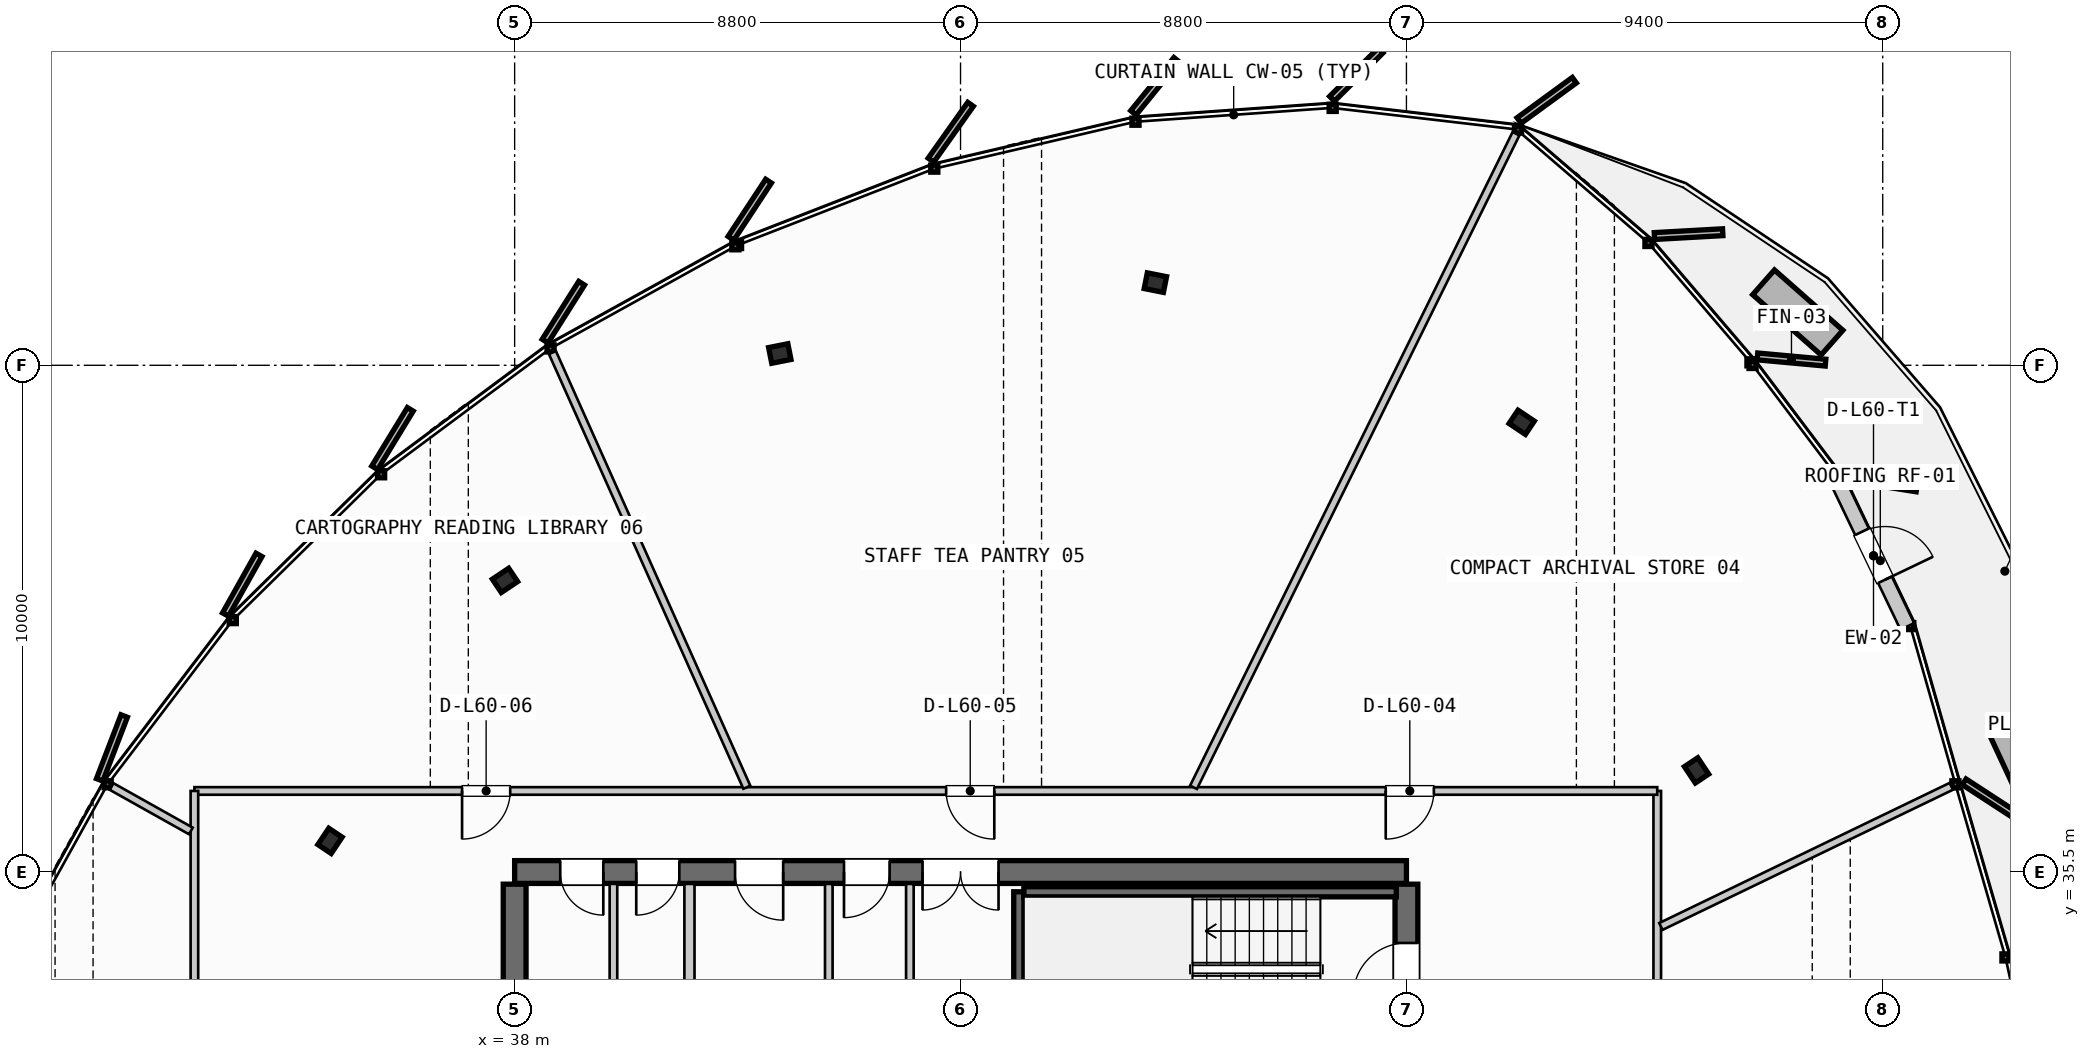
"""IFC4 building model, lengths in metres.
Left out: names, types, materials, properties, quantities, classifications, styles, units other than length and angle.
Written with IfcOpenShell. Run it as: python <this file> out.ifc"""

import sys

from ifc_helpers import new_model, si_unit, direction, frame, frame_2d, origin, origin_2d, place, context, subcontext, project, spatial, rectangle, i_section, extrude, source, transform, mapped, element, fill, save


model = new_model("IFC4")
c1 = context("Model", 3, precision=1e-05, world=origin(), true_north=direction((0.0, 1.0)))
c2 = subcontext(c1, "Body", "Model", "MODEL_VIEW")
j1 = project(units=[si_unit("LENGTHUNIT", "METRE"), si_unit("PLANEANGLEUNIT", "RADIAN")], contexts=[c1])
p1 = place(None, origin())
s1 = spatial("IfcSite", under=j1, at=p1, CompositionType="ELEMENT")
p2 = place(p1, origin())
s2 = spatial("IfcBuilding", under=s1, at=p2, CompositionType="ELEMENT")
p3 = place(p2, frame((0.0, 0.0, 231.85)))
s3 = spatial("IfcBuildingStorey", under=s2, at=p3, CompositionType="ELEMENT", Elevation=231.85)
p4 = place(p3, frame((55.6, 35.5, 0.0), z_axis=(0.0, 0.0, 1.0), x_axis=(-1.0, 0.0, 0.0)))
e1 = element("IfcWall", 1, at=p4, inside=s3, PredefinedType="SHEAR", context=c2, shape_type="SweptSolid", body=[
    extrude(rectangle(XDim=17.6, YDim=0.45, at=frame_2d((8.8, 0.0))), origin(), (0.0, 0.0, 1.0), 3.21),
])
p5 = place(p4, frame((8.05, 0.0, 0.0)))
e2 = element("IfcOpeningElement", 2, at=p5, cuts=e1, PredefinedType="OPENING", context=c2, shape_type="SweptSolid", body=[
    extrude(rectangle(XDim=1.5, YDim=2.2, at=frame_2d((0.75, 1.1))), frame((0.0, 0.235, 0.0), z_axis=(0.0, -1.0, 0.0), x_axis=(1.0, 0.0, 0.0)), (0.0, 0.0, 1.0), 0.47),
])
p6 = place(p4, frame((15.85, 0.0, 0.0)))
e3 = element("IfcOpeningElement", 3, at=p6, cuts=e1, PredefinedType="OPENING", context=c2, shape_type="SweptSolid", body=[
    extrude(rectangle(XDim=0.85, YDim=2.15, at=frame_2d((0.425, 1.075))), frame((0.0, 0.235, 0.0), z_axis=(0.0, -1.0, 0.0), x_axis=(1.0, 0.0, 0.0)), (0.0, 0.0, 1.0), 0.47),
])
p7 = place(p4, frame((14.35, 0.0, 0.0)))
e4 = element("IfcOpeningElement", 4, at=p7, cuts=e1, PredefinedType="OPENING", context=c2, shape_type="SweptSolid", body=[
    extrude(rectangle(XDim=0.85, YDim=2.15, at=frame_2d((0.425, 1.075))), frame((0.0, 0.235, 0.0), z_axis=(0.0, -1.0, 0.0), x_axis=(1.0, 0.0, 0.0)), (0.0, 0.0, 1.0), 0.47),
])
p8 = place(p4, frame((12.3, 0.0, 0.0)))
e5 = element("IfcOpeningElement", 5, at=p8, cuts=e1, PredefinedType="OPENING", context=c2, shape_type="SweptSolid", body=[
    extrude(rectangle(XDim=0.95, YDim=2.15, at=frame_2d((0.475, 1.075))), frame((0.0, 0.235, 0.0), z_axis=(0.0, -1.0, 0.0), x_axis=(1.0, 0.0, 0.0)), (0.0, 0.0, 1.0), 0.47),
])
p9 = place(p4, frame((10.2, 0.0, 0.0)))
e6 = element("IfcOpeningElement", 6, at=p9, cuts=e1, PredefinedType="OPENING", context=c2, shape_type="SweptSolid", body=[
    extrude(rectangle(XDim=0.9, YDim=2.15, at=frame_2d((0.45, 1.075))), frame((0.0, 0.235, 0.0), z_axis=(0.0, -1.0, 0.0), x_axis=(1.0, 0.0, 0.0)), (0.0, 0.0, 1.0), 0.47),
])
p10 = place(p3, frame((38.0, 35.26, 0.0), z_axis=(0.0, 0.0, 1.0), x_axis=(0.0, -1.0, 0.0)))
e7 = element("IfcWall", 7, at=p10, inside=s3, PredefinedType="SHEAR", context=c2, shape_type="SweptSolid", body=[
    extrude(rectangle(XDim=14.92, YDim=0.45, at=frame_2d((7.46, 0.0))), origin(), (0.0, 0.0, 1.0), 3.21),
])
p11 = place(p10, frame((5.21, 0.0, 0.0)))
e8 = element("IfcOpeningElement", 8, at=p11, cuts=e7, PredefinedType="OPENING", context=c2, shape_type="SweptSolid", body=[
    extrude(rectangle(XDim=1.1, YDim=2.2, at=frame_2d((0.55, 1.1))), frame((0.0, 0.235, 0.0), z_axis=(0.0, -1.0, 0.0), x_axis=(1.0, 0.0, 0.0)), (0.0, 0.0, 1.0), 0.47),
])
p12 = place(p3, frame((55.6, 20.34, 0.0), z_axis=(0.0, 0.0, 1.0), x_axis=(0.0, 1.0, 0.0)))
e9 = element("IfcWall", 9, at=p12, inside=s3, PredefinedType="SHEAR", context=c2, shape_type="SweptSolid", body=[
    extrude(rectangle(XDim=14.92, YDim=0.45, at=frame_2d((7.46, 0.0))), origin(), (0.0, 0.0, 1.0), 3.21),
])
p13 = place(p12, frame((12.71, 0.0, 0.0)))
e10 = element("IfcOpeningElement", 10, at=p13, cuts=e9, PredefinedType="OPENING", context=c2, shape_type="SweptSolid", body=[
    extrude(rectangle(XDim=1.05, YDim=2.15, at=frame_2d((0.525, 1.075))), frame((0.0, 0.235, 0.0), z_axis=(0.0, -1.0, 0.0), x_axis=(1.0, 0.0, 0.0)), (0.0, 0.0, 1.0), 0.47),
])
p14 = place(p12, frame((8.61, 0.0, 0.0)))
e11 = element("IfcOpeningElement", 11, at=p14, cuts=e9, PredefinedType="OPENING", context=c2, shape_type="SweptSolid", body=[
    extrude(rectangle(XDim=1.1, YDim=2.2, at=frame_2d((0.55, 1.1))), frame((0.0, 0.235, 0.0), z_axis=(0.0, -1.0, 0.0), x_axis=(1.0, 0.0, 0.0)), (0.0, 0.0, 1.0), 0.47),
])
m1 = source(origin(), c2, "Body", "SweptSolid", [
    extrude(i_section(OverallWidth=0.387, OverallDepth=0.316, WebThickness=0.019, FlangeThickness=0.028, FilletRadius=0.015, at=origin_2d()), origin(), (0.0, 0.0, 1.0), 3.21),
])
for number, where, z_axis, x_axis in (
    (12, (61.326, 37.506, 0.0), (0.0, 0.0, 1.0), (0.831, 0.556, 0.0)),
    (13, (57.875, 44.375, 0.0), (0.0, 0.0, 1.0), (0.556, 0.831, 0.0)),
    (14, (50.645, 47.132, 0.0), (0.0, 0.0, 1.0), (0.195, 0.981, 0.0)),
    (15, (43.233, 45.732, 0.0), (0.0, 0.0, 1.0), (-0.195, 0.981, 0.0)),
    (16, (37.81, 41.255, 0.0), (0.0, 0.0, 1.0), (-0.556, 0.831, 0.0)),
    (17, (34.356, 36.115, 0.0), (0.0, 0.0, 1.0), (-0.831, 0.556, 0.0)),
):
    element("IfcColumn", number, at=place(p3, frame(where, z_axis=z_axis, x_axis=x_axis)), inside=s3, PredefinedType="COLUMN", context=c2, shape_type="MappedRepresentation", body=[
        mapped(m1, transform((0.0, 0.0, 0.0), scale=1.0)),
    ])
p15 = place(p3, frame((64.15, 43.136, 0.0), z_axis=(0.0, 0.0, 1.0), x_axis=(0.431829849954, -0.901955087955, 0.0)))
e18 = element("IfcWall", 18, at=p15, inside=s3, PredefinedType="SOLIDWALL", context=c2, shape_type="SweptSolid", body=[
    extrude(rectangle(XDim=3.092, YDim=0.3, at=frame_2d((1.546, 0.0))), origin(), (0.0, 0.0, 1.0), 2.735),
])
p16 = place(p15, frame((1.021, 0.0, 0.0)))
e19 = element("IfcOpeningElement", 19, at=p16, cuts=e18, PredefinedType="OPENING", context=c2, shape_type="SweptSolid", body=[
    extrude(rectangle(XDim=1.05, YDim=2.2, at=frame_2d((0.525, 1.1))), frame((0.0, 0.16, 0.0), z_axis=(0.0, -1.0, 0.0), x_axis=(1.0, 0.0, 0.0)), (0.0, 0.0, 1.0), 0.32),
])
p17 = place(p3, frame((47.95, 32.05, 0.0), z_axis=(0.0, 0.0, 1.0), x_axis=(0.0, 1.0, 0.0)))
e20 = element("IfcWall", 20, at=p17, inside=s3, PredefinedType="SHEAR", context=c2, shape_type="SweptSolid", body=[
    extrude(rectangle(XDim=3.06, YDim=0.2, at=frame_2d((1.53, 0.0))), origin(), (0.0, 0.0, 1.0), 3.21),
])
p18 = place(p3, frame((48.05, 35.11, 0.0), z_axis=(0.0, 0.0, 1.0), x_axis=(1.0, 0.0, 0.0)))
e21 = element("IfcWall", 21, at=p18, inside=s3, PredefinedType="SHEAR", context=c2, shape_type="SweptSolid", body=[
    extrude(rectangle(XDim=7.35, YDim=0.2, at=frame_2d((3.675, 0.0))), origin(), (0.0, 0.0, 1.0), 3.21),
])
p19 = place(p3, frame((41.45, 31.85, 0.0), z_axis=(0.0, 0.0, 1.0), x_axis=(0.0, 1.0, 0.0)))
e22 = element("IfcWall", 22, at=p19, inside=s3, PredefinedType="PARTITIONING", context=c2, shape_type="SweptSolid", body=[
    extrude(rectangle(XDim=3.415, YDim=0.2, at=frame_2d((1.708, 0.0))), origin(), (0.0, 0.0, 1.0), 2.28),
])
for number, where, z_axis, x_axis in (
    (23, (45.8, 31.85, 0.0), (0.0, 0.0, 1.0), (0.0, 1.0, 0.0)),
    (24, (39.95, 31.85, 0.0), (0.0, 0.0, 1.0), (0.0, 1.0, 0.0)),
):
    element("IfcWall", number, at=place(p3, frame(where, z_axis=z_axis, x_axis=x_axis)), inside=s3, PredefinedType="PARTITIONING", context=c2, shape_type="SweptSolid", body=[
        extrude(rectangle(XDim=3.415, YDim=0.15, at=frame_2d((1.708, 0.0))), origin(), (0.0, 0.0, 1.0), 2.28),
    ])
p20 = place(p3, frame((44.2, 31.85, 0.0), z_axis=(0.0, 0.0, 1.0), x_axis=(0.0, 1.0, 0.0)))
e25 = element("IfcWall", 25, at=p20, inside=s3, PredefinedType="PLUMBINGWALL", context=c2, shape_type="SweptSolid", body=[
    extrude(rectangle(XDim=3.415, YDim=0.15, at=frame_2d((1.708, 0.0))), origin(), (0.0, 0.0, 1.0), 2.28),
])
p21 = place(p3, frame((60.55, 18.269, 0.0), z_axis=(0.0, 0.0, 1.0), x_axis=(0.0, 1.0, 0.0)))
e26 = element("IfcWall", 26, at=p21, inside=s3, PredefinedType="PARTITIONING", context=c2, shape_type="SweptSolid", body=[
    extrude(rectangle(XDim=18.831, YDim=0.15, at=frame_2d((9.416, 0.0))), origin(), (0.0, 0.0, 1.0), 2.28),
])
p22 = place(p21, frame((8.508, 0.0, 0.0)))
e27 = element("IfcOpeningElement", 27, at=p22, cuts=e26, PredefinedType="OPENING", context=c2, shape_type="SweptSolid", body=[
    extrude(rectangle(XDim=0.95, YDim=2.15, at=frame_2d((0.475, 1.075))), frame((0.0, 0.085, 0.0), z_axis=(0.0, -1.0, 0.0), x_axis=(1.0, 0.0, 0.0)), (0.0, 0.0, 1.0), 0.17),
])
p23 = place(p3, frame((60.55, 37.1, 0.0), z_axis=(0.0, 0.0, 1.0), x_axis=(-1.0, 0.0, 0.0)))
e28 = element("IfcWall", 28, at=p23, inside=s3, PredefinedType="PARTITIONING", context=c2, shape_type="SweptSolid", body=[
    extrude(rectangle(XDim=28.87, YDim=0.15, at=frame_2d((14.435, 0.0))), origin(), (0.0, 0.0, 1.0), 2.28),
])
p24 = place(p23, frame((4.409, 0.0, 0.0)))
e29 = element("IfcOpeningElement", 29, at=p24, cuts=e28, PredefinedType="OPENING", context=c2, shape_type="SweptSolid", body=[
    extrude(rectangle(XDim=0.95, YDim=2.15, at=frame_2d((0.475, 1.075))), frame((0.0, 0.085, 0.0), z_axis=(0.0, -1.0, 0.0), x_axis=(1.0, 0.0, 0.0)), (0.0, 0.0, 1.0), 0.17),
])
p25 = place(p23, frame((13.084, 0.0, 0.0)))
e30 = element("IfcOpeningElement", 30, at=p25, cuts=e28, PredefinedType="OPENING", context=c2, shape_type="SweptSolid", body=[
    extrude(rectangle(XDim=0.95, YDim=2.15, at=frame_2d((0.475, 1.075))), frame((0.0, 0.085, 0.0), z_axis=(0.0, -1.0, 0.0), x_axis=(1.0, 0.0, 0.0)), (0.0, 0.0, 1.0), 0.17),
])
p26 = place(p23, frame((22.637, 0.0, 0.0)))
e31 = element("IfcOpeningElement", 31, at=p26, cuts=e28, PredefinedType="OPENING", context=c2, shape_type="SweptSolid", body=[
    extrude(rectangle(XDim=0.95, YDim=2.15, at=frame_2d((0.475, 1.075))), frame((0.0, 0.085, 0.0), z_axis=(0.0, -1.0, 0.0), x_axis=(1.0, 0.0, 0.0)), (0.0, 0.0, 1.0), 0.17),
])
p27 = place(p3, frame((31.68, 37.1, 0.0), z_axis=(0.0, 0.0, 1.0), x_axis=(0.0, -1.0, 0.0)))
e32 = element("IfcWall", 32, at=p27, inside=s3, PredefinedType="PARTITIONING", context=c2, shape_type="SweptSolid", body=[
    extrude(rectangle(XDim=18.831, YDim=0.15, at=frame_2d((9.416, 0.0))), origin(), (0.0, 0.0, 1.0), 2.28),
])
p28 = place(p27, frame((9.044, 0.0, 0.0)))
e33 = element("IfcOpeningElement", 33, at=p28, cuts=e32, PredefinedType="OPENING", context=c2, shape_type="SweptSolid", body=[
    extrude(rectangle(XDim=0.95, YDim=2.15, at=frame_2d((0.475, 1.075))), frame((0.0, 0.085, 0.0), z_axis=(0.0, -1.0, 0.0), x_axis=(1.0, 0.0, 0.0)), (0.0, 0.0, 1.0), 0.17),
])
p29 = place(p3, frame((60.622, 34.426, 0.0), z_axis=(0.0, 0.0, 1.0), x_axis=(0.900645362469, 0.434554865424, 0.0)))
e34 = element("IfcWall", 34, at=p29, inside=s3, PredefinedType="PARTITIONING", context=c2, shape_type="SweptSolid", body=[
    extrude(rectangle(XDim=6.364, YDim=0.15, at=frame_2d((3.182, 0.0))), origin(), (0.0, 0.0, 1.0), 2.28),
])
p30 = place(p3, frame((51.398, 37.172, 0.0), z_axis=(0.0, 0.0, 1.0), x_axis=(0.442495584372, 0.896770682957, 0.0)))
e35 = element("IfcWall", 35, at=p30, inside=s3, PredefinedType="PARTITIONING", context=c2, shape_type="SweptSolid", body=[
    extrude(rectangle(XDim=14.384, YDim=0.15, at=frame_2d((7.192, 0.0))), origin(), (0.0, 0.0, 1.0), 2.28),
])
p31 = place(p3, frame((42.583, 37.173, 0.0), z_axis=(0.0, 0.0, 1.0), x_axis=(-0.40829484659, 0.912850107218, 0.0)))
e36 = element("IfcWall", 36, at=p31, inside=s3, PredefinedType="PARTITIONING", context=c2, shape_type="SweptSolid", body=[
    extrude(rectangle(XDim=9.397, YDim=0.15, at=frame_2d((4.698, 0.0))), origin(), (0.0, 0.0, 1.0), 2.28),
])
p32 = place(p3, frame((31.61, 36.311, 0.0), z_axis=(0.0, 0.0, 1.0), x_axis=(-0.872236549991, 0.489084247201, 0.0)))
e37 = element("IfcWall", 37, at=p32, inside=s3, PredefinedType="PARTITIONING", context=c2, shape_type="SweptSolid", body=[
    extrude(rectangle(XDim=1.793, YDim=0.15, at=frame_2d((0.896, 0.0))), origin(), (0.0, 0.0, 1.0), 2.28),
])
m2 = source(origin(), c2, "Body", "SweptSolid", [
    extrude(rectangle(XDim=1.05, YDim=2.2, at=frame_2d((0.525, 1.1))), frame((0.0, 0.025, 0.0), z_axis=(0.0, -1.0, 0.0), x_axis=(1.0, 0.0, 0.0)), (0.0, 0.0, 1.0), 0.05),
])
p33 = place(p16, origin())
e38 = element("IfcDoor", 38, at=p33, inside=s3, OperationType="SINGLE_SWING_RIGHT", PredefinedType="DOOR", context=c2, shape_type="MappedRepresentation", body=[
    mapped(m2, transform((0.0, 0.0, 0.0), scale=1.0)),
])
fill(e19, e38)
m3 = source(origin(), c2, "Body", "SweptSolid", [
    extrude(rectangle(XDim=1.05, YDim=2.15, at=frame_2d((0.525, 1.075))), frame((0.0, 0.025, 0.0), z_axis=(0.0, -1.0, 0.0), x_axis=(1.0, 0.0, 0.0)), (0.0, 0.0, 1.0), 0.05),
])
p34 = place(p13, origin())
e39 = element("IfcDoor", 39, at=p34, inside=s3, OperationType="SINGLE_SWING_LEFT", PredefinedType="DOOR", context=c2, shape_type="MappedRepresentation", body=[
    mapped(m3, transform((0.0, 0.0, 0.0), scale=1.0)),
])
fill(e10, e39)
m4 = source(origin(), c2, "Body", "SweptSolid", [
    extrude(rectangle(XDim=1.5, YDim=2.2, at=frame_2d((0.75, 1.1))), frame((0.0, 0.025, 0.0), z_axis=(0.0, -1.0, 0.0), x_axis=(1.0, 0.0, 0.0)), (0.0, 0.0, 1.0), 0.05),
])
p35 = place(p5, origin())
e40 = element("IfcDoor", 40, at=p35, inside=s3, OperationType="DOUBLE_DOOR_SINGLE_SWING", PredefinedType="DOOR", context=c2, shape_type="MappedRepresentation", body=[
    mapped(m4, transform((0.0, 0.0, 0.0), scale=1.0)),
])
fill(e2, e40)
m5 = source(origin(), c2, "Body", "SweptSolid", [
    extrude(rectangle(XDim=0.85, YDim=2.15, at=frame_2d((0.425, 1.075))), frame((0.0, 0.025, 0.0), z_axis=(0.0, -1.0, 0.0), x_axis=(1.0, 0.0, 0.0)), (0.0, 0.0, 1.0), 0.05),
])
p36 = place(p6, origin())
e41 = element("IfcDoor", 41, at=p36, inside=s3, OperationType="SINGLE_SWING_LEFT", PredefinedType="DOOR", context=c2, shape_type="MappedRepresentation", body=[
    mapped(m5, transform((0.0, 0.0, 0.0), scale=1.0)),
])
fill(e3, e41)
p37 = place(p7, origin())
e42 = element("IfcDoor", 42, at=p37, inside=s3, OperationType="SINGLE_SWING_RIGHT", PredefinedType="DOOR", context=c2, shape_type="MappedRepresentation", body=[
    mapped(m5, transform((0.0, 0.0, 0.0), scale=1.0)),
])
fill(e4, e42)
m6 = source(origin(), c2, "Body", "SweptSolid", [
    extrude(rectangle(XDim=0.95, YDim=2.15, at=frame_2d((0.475, 1.075))), frame((0.0, 0.025, 0.0), z_axis=(0.0, -1.0, 0.0), x_axis=(1.0, 0.0, 0.0)), (0.0, 0.0, 1.0), 0.05),
])
p38 = place(p8, origin())
e43 = element("IfcDoor", 43, at=p38, inside=s3, OperationType="SINGLE_SWING_LEFT", PredefinedType="DOOR", context=c2, shape_type="MappedRepresentation", body=[
    mapped(m6, transform((0.0, 0.0, 0.0), scale=1.0)),
])
fill(e5, e43)
m7 = source(origin(), c2, "Body", "SweptSolid", [
    extrude(rectangle(XDim=0.9, YDim=2.15, at=frame_2d((0.45, 1.075))), frame((0.0, 0.025, 0.0), z_axis=(0.0, -1.0, 0.0), x_axis=(1.0, 0.0, 0.0)), (0.0, 0.0, 1.0), 0.05),
])
p39 = place(p9, origin())
e44 = element("IfcDoor", 44, at=p39, inside=s3, OperationType="SINGLE_SWING_RIGHT", PredefinedType="DOOR", context=c2, shape_type="MappedRepresentation", body=[
    mapped(m7, transform((0.0, 0.0, 0.0), scale=1.0)),
])
fill(e6, e44)
p40 = place(p24, origin())
e45 = element("IfcDoor", 45, at=p40, inside=s3, OperationType="SINGLE_SWING_RIGHT", PredefinedType="DOOR", context=c2, shape_type="MappedRepresentation", body=[
    mapped(m6, transform((0.0, 0.0, 0.0), scale=1.0)),
])
fill(e29, e45)
p41 = place(p25, origin())
e46 = element("IfcDoor", 46, at=p41, inside=s3, OperationType="SINGLE_SWING_LEFT", PredefinedType="DOOR", context=c2, shape_type="MappedRepresentation", body=[
    mapped(m6, transform((0.0, 0.0, 0.0), scale=1.0)),
])
fill(e30, e46)
p42 = place(p26, origin())
e47 = element("IfcDoor", 47, at=p42, inside=s3, OperationType="SINGLE_SWING_RIGHT", PredefinedType="DOOR", context=c2, shape_type="MappedRepresentation", body=[
    mapped(m6, transform((0.0, 0.0, 0.0), scale=1.0)),
])
fill(e31, e47)
save(model, sys.argv[1])
